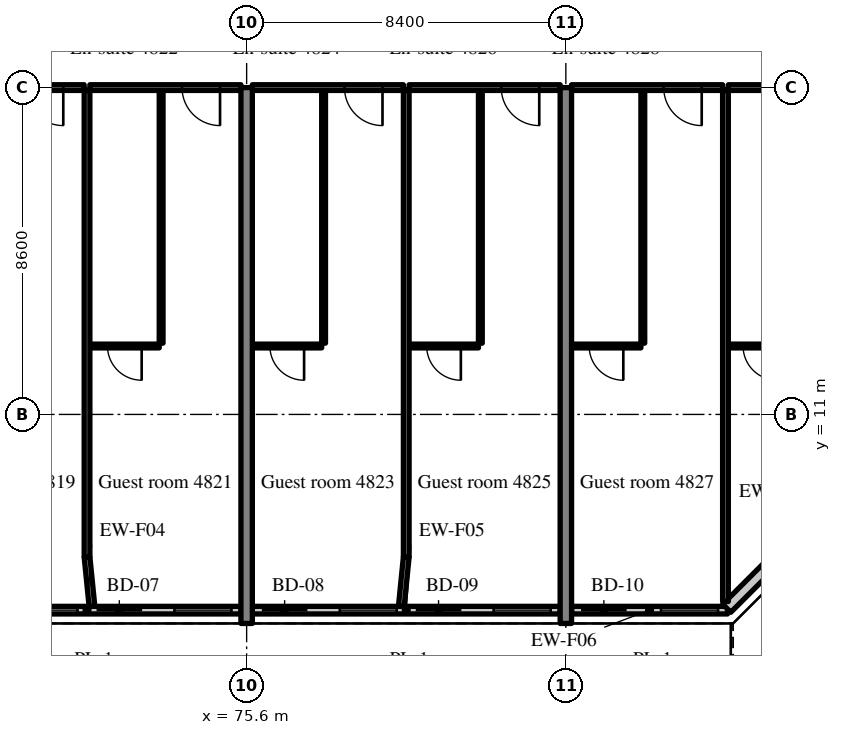
"""IFC4 building model, lengths in metres.
Left out: names, types, materials, properties, quantities, classifications, styles, units other than length and angle.
Written with IfcOpenShell. Run it as: python <this file> out.ifc"""

import sys

from ifc_helpers import new_model, si_unit, direction, frame, frame_2d, origin, place, context, subcontext, project, spatial, rectangle, extrude, source, transform, mapped, element, fill, save


model = new_model("IFC4")
c1 = context("Model", 3, precision=1e-05, world=origin(), true_north=direction((0.0, 1.0)))
c2 = subcontext(c1, "Body", "Model", "MODEL_VIEW")
j1 = project(units=[si_unit("LENGTHUNIT", "METRE"), si_unit("PLANEANGLEUNIT", "RADIAN")], contexts=[c1])
p1 = place(None, origin())
s1 = spatial("IfcSite", under=j1, at=p1, CompositionType="ELEMENT")
p2 = place(p1, origin())
s2 = spatial("IfcBuilding", under=s1, at=p2, CompositionType="ELEMENT")
p3 = place(p2, frame((0.0, 0.0, 197.2)))
s3 = spatial("IfcBuildingStorey", under=s2, at=p3, CompositionType="ELEMENT", Elevation=197.2)
m1 = source(origin(), c2, "Body", "SweptSolid", [
    extrude(rectangle(XDim=14.1, YDim=0.3, at=frame_2d((7.05, 0.0))), origin(), (0.0, 0.0, 1.0), 3.52),
])
for number, where, z_axis, x_axis in (
    (1, (75.6, 5.5, 0.0), (0.0, 0.0, 1.0), (0.0, 1.0, 0.0)),
    (2, (84.0, 5.5, 0.0), (0.0, 0.0, 1.0), (0.0, 1.0, 0.0)),
):
    element("IfcWall", number, at=place(p3, frame(where, z_axis=z_axis, x_axis=x_axis)), inside=s3, PredefinedType="SHEAR", context=c2, shape_type="MappedRepresentation", body=[
        mapped(m1, transform((0.0, 0.0, 0.0), scale=1.0)),
    ])
m2 = source(origin(), c2, "Body", "SweptSolid", [
    extrude(rectangle(XDim=8.1, YDim=0.2, at=frame_2d((4.05, 0.0))), origin(), (0.0, 0.0, 1.0), 2.87),
])
p4 = place(p3, frame((67.35, 5.85, 0.0), z_axis=(0.0, 0.0, 1.0), x_axis=(1.0, 0.0, 0.0)))
e3 = element("IfcWall", 3, at=p4, inside=s3, PredefinedType="SOLIDWALL", context=c2, shape_type="MappedRepresentation", body=[
    mapped(m2, transform((0.0, 0.0, 0.0), scale=1.0)),
])
m3 = source(origin(), c2, "Body", "SweptSolid", [
    extrude(rectangle(XDim=1.2, YDim=2.4, at=frame_2d((0.6, 1.2))), frame((0.0, 0.11, 0.0), z_axis=(0.0, -1.0, 0.0), x_axis=(1.0, 0.0, 0.0)), (0.0, 0.0, 1.0), 0.22),
])
p5 = place(p4, frame((0.25, 0.0, 0.0)))
e4 = element("IfcOpeningElement", 4, at=p5, cuts=e3, PredefinedType="OPENING", context=c2, shape_type="MappedRepresentation", body=[
    mapped(m3, transform((0.0, 0.0, 0.0), scale=1.0)),
])
m4 = source(origin(), c2, "Body", "SweptSolid", [
    extrude(rectangle(XDim=1.5, YDim=1.5, at=frame_2d((0.75, 0.75))), frame((0.0, 0.11, 0.0), z_axis=(0.0, -1.0, 0.0), x_axis=(1.0, 0.0, 0.0)), (0.0, 0.0, 1.0), 0.22),
])
p6 = place(p4, frame((2.3, 0.0, 0.9)))
e5 = element("IfcOpeningElement", 5, at=p6, cuts=e3, PredefinedType="OPENING", context=c2, shape_type="MappedRepresentation", body=[
    mapped(m4, transform((0.0, 0.0, 0.0), scale=1.0)),
])
p7 = place(p4, frame((4.3, 0.0, 0.0)))
e6 = element("IfcOpeningElement", 6, at=p7, cuts=e3, PredefinedType="OPENING", context=c2, shape_type="MappedRepresentation", body=[
    mapped(m3, transform((0.0, 0.0, 0.0), scale=1.0)),
])
p8 = place(p4, frame((6.35, 0.0, 0.9)))
e7 = element("IfcOpeningElement", 7, at=p8, cuts=e3, PredefinedType="OPENING", context=c2, shape_type="MappedRepresentation", body=[
    mapped(m4, transform((0.0, 0.0, 0.0), scale=1.0)),
])
m5 = source(origin(), c2, "Body", "SweptSolid", [
    extrude(rectangle(XDim=8.1, YDim=0.2, at=frame_2d((4.05, 0.0))), origin(), (0.0, 0.0, 1.0), 2.87),
])
p9 = place(p3, frame((75.75, 5.85, 0.0), z_axis=(0.0, 0.0, 1.0), x_axis=(1.0, 0.0, 0.0)))
e8 = element("IfcWall", 8, at=p9, inside=s3, PredefinedType="SOLIDWALL", context=c2, shape_type="MappedRepresentation", body=[
    mapped(m5, transform((0.0, 0.0, 0.0), scale=1.0)),
])
p10 = place(p9, frame((0.25, 0.0, 0.0)))
e9 = element("IfcOpeningElement", 9, at=p10, cuts=e8, PredefinedType="OPENING", context=c2, shape_type="MappedRepresentation", body=[
    mapped(m3, transform((0.0, 0.0, 0.0), scale=1.0)),
])
p11 = place(p9, frame((2.3, 0.0, 0.9)))
e10 = element("IfcOpeningElement", 10, at=p11, cuts=e8, PredefinedType="OPENING", context=c2, shape_type="MappedRepresentation", body=[
    mapped(m4, transform((0.0, 0.0, 0.0), scale=1.0)),
])
p12 = place(p9, frame((4.3, 0.0, 0.0)))
e11 = element("IfcOpeningElement", 11, at=p12, cuts=e8, PredefinedType="OPENING", context=c2, shape_type="MappedRepresentation", body=[
    mapped(m3, transform((0.0, 0.0, 0.0), scale=1.0)),
])
p13 = place(p9, frame((6.35, 0.0, 0.9)))
e12 = element("IfcOpeningElement", 12, at=p13, cuts=e8, PredefinedType="OPENING", context=c2, shape_type="MappedRepresentation", body=[
    mapped(m4, transform((0.0, 0.0, 0.0), scale=1.0)),
])
m6 = source(origin(), c2, "Body", "SweptSolid", [
    extrude(rectangle(XDim=4.105, YDim=0.2, at=frame_2d((2.052, 0.0))), origin(), (0.0, 0.0, 1.0), 2.87),
])
p14 = place(p3, frame((84.15, 5.85, 0.0), z_axis=(0.0, 0.0, 1.0), x_axis=(1.0, 0.0, 0.0)))
e13 = element("IfcWall", 13, at=p14, inside=s3, PredefinedType="SOLIDWALL", context=c2, shape_type="MappedRepresentation", body=[
    mapped(m6, transform((0.0, 0.0, 0.0), scale=1.0)),
])
p15 = place(p14, frame((0.25, 0.0, 0.0)))
e14 = element("IfcOpeningElement", 14, at=p15, cuts=e13, PredefinedType="OPENING", context=c2, shape_type="MappedRepresentation", body=[
    mapped(m3, transform((0.0, 0.0, 0.0), scale=1.0)),
])
p16 = place(p14, frame((2.355, 0.0, 0.9)))
e15 = element("IfcOpeningElement", 15, at=p16, cuts=e13, PredefinedType="OPENING", context=c2, shape_type="MappedRepresentation", body=[
    mapped(m4, transform((0.0, 0.0, 0.0), scale=1.0)),
])
m7 = source(origin(), c2, "Body", "SweptSolid", [
    extrude(rectangle(XDim=5.326, YDim=0.3, at=frame_2d((2.663, 0.0))), origin(), (0.0, 0.0, 1.0), 3.52),
])
p17 = place(p3, frame((88.234, 5.9, 0.0), z_axis=(0.0, 0.0, 1.0), x_axis=(0.707083859269, 0.707129702361, 0.0)))
e16 = element("IfcWall", 16, at=p17, inside=s3, PredefinedType="SOLIDWALL", context=c2, shape_type="MappedRepresentation", body=[
    mapped(m7, transform((0.0, 0.0, 0.0), scale=1.0)),
])
m8 = source(origin(), c2, "Body", "SweptSolid", [
    extrude(rectangle(XDim=1.8, YDim=1.5, at=frame_2d((0.9, 0.75))), frame((0.0, 0.16, 0.0), z_axis=(0.0, -1.0, 0.0), x_axis=(1.0, 0.0, 0.0)), (0.0, 0.0, 1.0), 0.32),
])
p18 = place(p17, frame((1.689, 0.0, 0.9)))
e17 = element("IfcOpeningElement", 17, at=p18, cuts=e16, PredefinedType="OPENING", context=c2, shape_type="MappedRepresentation", body=[
    mapped(m8, transform((0.0, 0.0, 0.0), scale=1.0)),
])
m9 = source(origin(), c2, "Body", "SweptSolid", [
    extrude(rectangle(XDim=3.975, YDim=0.15, at=frame_2d((1.987, 0.0))), origin(), (0.0, 0.0, 1.0), 2.82),
])
p19 = place(p3, frame((67.35, 19.6, 0.0), z_axis=(0.0, 0.0, 1.0), x_axis=(1.0, 0.0, 0.0)))
e18 = element("IfcWall", 18, at=p19, inside=s3, PredefinedType="PARTITIONING", context=c2, shape_type="MappedRepresentation", body=[
    mapped(m9, transform((0.0, 0.0, 0.0), scale=1.0)),
])
m10 = source(origin(), c2, "Body", "SweptSolid", [
    extrude(rectangle(XDim=1.0, YDim=2.1, at=frame_2d((0.5, 1.05))), frame((0.0, 0.085, 0.0), z_axis=(0.0, -1.0, 0.0), x_axis=(1.0, 0.0, 0.0)), (0.0, 0.0, 1.0), 0.17),
])
p20 = place(p19, frame((2.425, 0.0, 0.0)))
e19 = element("IfcOpeningElement", 19, at=p20, cuts=e18, PredefinedType="OPENING", context=c2, shape_type="MappedRepresentation", body=[
    mapped(m10, transform((0.0, 0.0, 0.0), scale=1.0)),
])
m11 = source(origin(), c2, "Body", "SweptSolid", [
    extrude(rectangle(XDim=6.65, YDim=0.1, at=frame_2d((3.325, 0.0))), origin(), (0.0, 0.0, 1.0), 3.52),
])
p21 = place(p3, frame((73.35, 12.875, 0.0), z_axis=(0.0, 0.0, 1.0), x_axis=(0.0, 1.0, 0.0)))
e20 = element("IfcWall", 20, at=p21, inside=s3, PredefinedType="PARTITIONING", context=c2, shape_type="MappedRepresentation", body=[
    mapped(m11, transform((0.0, 0.0, 0.0), scale=1.0)),
])
m12 = source(origin(), c2, "Body", "SweptSolid", [
    extrude(rectangle(XDim=1.825, YDim=0.1, at=frame_2d((0.913, 0.0))), origin(), (0.0, 0.0, 1.0), 3.52),
])
p22 = place(p3, frame((71.475, 12.8, 0.0), z_axis=(0.0, 0.0, 1.0), x_axis=(1.0, 0.0, 0.0)))
e21 = element("IfcWall", 21, at=p22, inside=s3, PredefinedType="PARTITIONING", context=c2, shape_type="MappedRepresentation", body=[
    mapped(m12, transform((0.0, 0.0, 0.0), scale=1.0)),
])
m13 = source(origin(), c2, "Body", "SweptSolid", [
    extrude(rectangle(XDim=0.9, YDim=2.1, at=frame_2d((0.45, 1.05))), frame((0.0, 0.06, 0.0), z_axis=(0.0, -1.0, 0.0), x_axis=(1.0, 0.0, 0.0)), (0.0, 0.0, 1.0), 0.12),
])
p23 = place(p22, frame((0.463, 0.0, 0.0)))
e22 = element("IfcOpeningElement", 22, at=p23, cuts=e21, PredefinedType="OPENING", context=c2, shape_type="MappedRepresentation", body=[
    mapped(m13, transform((0.0, 0.0, 0.0), scale=1.0)),
])
p24 = place(p3, frame((71.475, 19.6, 0.0), z_axis=(0.0, 0.0, 1.0), x_axis=(1.0, 0.0, 0.0)))
e23 = element("IfcWall", 23, at=p24, inside=s3, PredefinedType="PARTITIONING", context=c2, shape_type="MappedRepresentation", body=[
    mapped(m9, transform((0.0, 0.0, 0.0), scale=1.0)),
])
p25 = place(p24, frame((2.425, 0.0, 0.0)))
e24 = element("IfcOpeningElement", 24, at=p25, cuts=e23, PredefinedType="OPENING", context=c2, shape_type="MappedRepresentation", body=[
    mapped(m10, transform((0.0, 0.0, 0.0), scale=1.0)),
])
m14 = source(origin(), c2, "Body", "SweptSolid", [
    extrude(rectangle(XDim=12.275, YDim=0.15, at=frame_2d((6.137, 0.0))), origin(), (0.0, 0.0, 1.0), 3.52),
])
p26 = place(p3, frame((71.4, 7.25, 0.0), z_axis=(0.0, 0.0, 1.0), x_axis=(0.0, 1.0, 0.0)))
e25 = element("IfcWall", 25, at=p26, inside=s3, PredefinedType="PARTITIONING", context=c2, shape_type="MappedRepresentation", body=[
    mapped(m14, transform((0.0, 0.0, 0.0), scale=1.0)),
])
p27 = place(p3, frame((77.625, 12.875, 0.0), z_axis=(0.0, 0.0, 1.0), x_axis=(0.0, 1.0, 0.0)))
e26 = element("IfcWall", 26, at=p27, inside=s3, PredefinedType="PARTITIONING", context=c2, shape_type="MappedRepresentation", body=[
    mapped(m11, transform((0.0, 0.0, 0.0), scale=1.0)),
])
p28 = place(p3, frame((75.75, 12.8, 0.0), z_axis=(0.0, 0.0, 1.0), x_axis=(1.0, 0.0, 0.0)))
e27 = element("IfcWall", 27, at=p28, inside=s3, PredefinedType="PARTITIONING", context=c2, shape_type="MappedRepresentation", body=[
    mapped(m12, transform((0.0, 0.0, 0.0), scale=1.0)),
])
p29 = place(p28, frame((0.462, 0.0, 0.0)))
e28 = element("IfcOpeningElement", 28, at=p29, cuts=e27, PredefinedType="OPENING", context=c2, shape_type="MappedRepresentation", body=[
    mapped(m13, transform((0.0, 0.0, 0.0), scale=1.0)),
])
m15 = source(origin(), c2, "Body", "SweptSolid", [
    extrude(rectangle(XDim=3.975, YDim=0.15, at=frame_2d((1.988, 0.0))), origin(), (0.0, 0.0, 1.0), 2.82),
])
p30 = place(p3, frame((75.75, 19.6, 0.0), z_axis=(0.0, 0.0, 1.0), x_axis=(1.0, 0.0, 0.0)))
e29 = element("IfcWall", 29, at=p30, inside=s3, PredefinedType="PARTITIONING", context=c2, shape_type="MappedRepresentation", body=[
    mapped(m15, transform((0.0, 0.0, 0.0), scale=1.0)),
])
p31 = place(p30, frame((2.425, 0.0, 0.0)))
e30 = element("IfcOpeningElement", 30, at=p31, cuts=e29, PredefinedType="OPENING", context=c2, shape_type="MappedRepresentation", body=[
    mapped(m10, transform((0.0, 0.0, 0.0), scale=1.0)),
])
p32 = place(p3, frame((81.75, 12.875, 0.0), z_axis=(0.0, 0.0, 1.0), x_axis=(0.0, 1.0, 0.0)))
e31 = element("IfcWall", 31, at=p32, inside=s3, PredefinedType="PARTITIONING", context=c2, shape_type="MappedRepresentation", body=[
    mapped(m11, transform((0.0, 0.0, 0.0), scale=1.0)),
])
p33 = place(p3, frame((79.875, 12.8, 0.0), z_axis=(0.0, 0.0, 1.0), x_axis=(1.0, 0.0, 0.0)))
e32 = element("IfcWall", 32, at=p33, inside=s3, PredefinedType="PARTITIONING", context=c2, shape_type="MappedRepresentation", body=[
    mapped(m12, transform((0.0, 0.0, 0.0), scale=1.0)),
])
p34 = place(p33, frame((0.462, 0.0, 0.0)))
e33 = element("IfcOpeningElement", 33, at=p34, cuts=e32, PredefinedType="OPENING", context=c2, shape_type="MappedRepresentation", body=[
    mapped(m13, transform((0.0, 0.0, 0.0), scale=1.0)),
])
p35 = place(p3, frame((79.875, 19.6, 0.0), z_axis=(0.0, 0.0, 1.0), x_axis=(1.0, 0.0, 0.0)))
e34 = element("IfcWall", 34, at=p35, inside=s3, PredefinedType="PARTITIONING", context=c2, shape_type="MappedRepresentation", body=[
    mapped(m15, transform((0.0, 0.0, 0.0), scale=1.0)),
])
p36 = place(p35, frame((2.425, 0.0, 0.0)))
e35 = element("IfcOpeningElement", 35, at=p36, cuts=e34, PredefinedType="OPENING", context=c2, shape_type="MappedRepresentation", body=[
    mapped(m10, transform((0.0, 0.0, 0.0), scale=1.0)),
])
p37 = place(p3, frame((79.8, 7.25, 0.0), z_axis=(0.0, 0.0, 1.0), x_axis=(0.0, 1.0, 0.0)))
e36 = element("IfcWall", 36, at=p37, inside=s3, PredefinedType="PARTITIONING", context=c2, shape_type="MappedRepresentation", body=[
    mapped(m14, transform((0.0, 0.0, 0.0), scale=1.0)),
])
p38 = place(p3, frame((86.025, 12.875, 0.0), z_axis=(0.0, 0.0, 1.0), x_axis=(0.0, 1.0, 0.0)))
e37 = element("IfcWall", 37, at=p38, inside=s3, PredefinedType="PARTITIONING", context=c2, shape_type="MappedRepresentation", body=[
    mapped(m11, transform((0.0, 0.0, 0.0), scale=1.0)),
])
m16 = source(origin(), c2, "Body", "SweptSolid", [
    extrude(rectangle(XDim=1.825, YDim=0.1, at=frame_2d((0.913, 0.0))), origin(), (0.0, 0.0, 1.0), 3.52),
])
p39 = place(p3, frame((84.15, 12.8, 0.0), z_axis=(0.0, 0.0, 1.0), x_axis=(1.0, 0.0, 0.0)))
e38 = element("IfcWall", 38, at=p39, inside=s3, PredefinedType="PARTITIONING", context=c2, shape_type="MappedRepresentation", body=[
    mapped(m16, transform((0.0, 0.0, 0.0), scale=1.0)),
])
p40 = place(p39, frame((0.462, 0.0, 0.0)))
e39 = element("IfcOpeningElement", 39, at=p40, cuts=e38, PredefinedType="OPENING", context=c2, shape_type="MappedRepresentation", body=[
    mapped(m13, transform((0.0, 0.0, 0.0), scale=1.0)),
])
p41 = place(p3, frame((84.15, 19.6, 0.0), z_axis=(0.0, 0.0, 1.0), x_axis=(1.0, 0.0, 0.0)))
e40 = element("IfcWall", 40, at=p41, inside=s3, PredefinedType="PARTITIONING", context=c2, shape_type="MappedRepresentation", body=[
    mapped(m15, transform((0.0, 0.0, 0.0), scale=1.0)),
])
p42 = place(p41, frame((2.425, 0.0, 0.0)))
e41 = element("IfcOpeningElement", 41, at=p42, cuts=e40, PredefinedType="OPENING", context=c2, shape_type="MappedRepresentation", body=[
    mapped(m10, transform((0.0, 0.0, 0.0), scale=1.0)),
])
m17 = source(origin(), c2, "Body", "SweptSolid", [
    extrude(rectangle(XDim=1.675, YDim=0.1, at=frame_2d((0.837, 0.0))), origin(), (0.0, 0.0, 1.0), 3.52),
])
p43 = place(p3, frame((88.275, 12.8, 0.0), z_axis=(0.0, 0.0, 1.0), x_axis=(1.0, 0.0, 0.0)))
e42 = element("IfcWall", 42, at=p43, inside=s3, PredefinedType="PARTITIONING", context=c2, shape_type="MappedRepresentation", body=[
    mapped(m17, transform((0.0, 0.0, 0.0), scale=1.0)),
])
p44 = place(p43, frame((0.388, 0.0, 0.0)))
e43 = element("IfcOpeningElement", 43, at=p44, cuts=e42, PredefinedType="OPENING", context=c2, shape_type="MappedRepresentation", body=[
    mapped(m13, transform((0.0, 0.0, 0.0), scale=1.0)),
])
m18 = source(origin(), c2, "Body", "SweptSolid", [
    extrude(rectangle(XDim=3.825, YDim=0.15, at=frame_2d((1.913, 0.0))), origin(), (0.0, 0.0, 1.0), 2.82),
])
p45 = place(p3, frame((88.275, 19.6, 0.0), z_axis=(0.0, 0.0, 1.0), x_axis=(1.0, 0.0, 0.0)))
e44 = element("IfcWall", 44, at=p45, inside=s3, PredefinedType="PARTITIONING", context=c2, shape_type="MappedRepresentation", body=[
    mapped(m18, transform((0.0, 0.0, 0.0), scale=1.0)),
])
p46 = place(p45, frame((2.275, 0.0, 0.0)))
e45 = element("IfcOpeningElement", 45, at=p46, cuts=e44, PredefinedType="OPENING", context=c2, shape_type="MappedRepresentation", body=[
    mapped(m10, transform((0.0, 0.0, 0.0), scale=1.0)),
])
m19 = source(origin(), c2, "Body", "SweptSolid", [
    extrude(rectangle(XDim=13.447, YDim=0.15, at=frame_2d((6.724, 0.0))), origin(), (0.0, 0.0, 1.0), 3.52),
])
p47 = place(p3, frame((88.2, 6.078, 0.0), z_axis=(0.0, 0.0, 1.0), x_axis=(0.0, 1.0, 0.0)))
e46 = element("IfcWall", 46, at=p47, inside=s3, PredefinedType="PARTITIONING", context=c2, shape_type="MappedRepresentation", body=[
    mapped(m19, transform((0.0, 0.0, 0.0), scale=1.0)),
])
m20 = source(origin(), c2, "Body", "SweptSolid", [
    extrude(rectangle(XDim=1.307, YDim=0.15, at=frame_2d((0.653, 0.0))), origin(), (0.0, 0.0, 1.0), 3.52),
])
for number, where, z_axis, x_axis in (
    (47, (71.53, 5.95, 0.0), (0.0, 0.0, 1.0), (-0.1, 0.995, 0.0)),
    (48, (79.67, 5.95, 0.0), (0.0, 0.0, 1.0), (0.1, 0.995, 0.0)),
):
    element("IfcWall", number, at=place(p3, frame(where, z_axis=z_axis, x_axis=x_axis)), inside=s3, PredefinedType="PARTITIONING", context=c2, shape_type="MappedRepresentation", body=[
        mapped(m20, transform((0.0, 0.0, 0.0), scale=1.0)),
    ])
m21 = source(origin(), c2, "Body", "SweptSolid", [
    extrude(rectangle(XDim=1.5, YDim=1.5, at=frame_2d((0.75, 0.75))), frame((0.0, 0.03, 0.0), z_axis=(0.0, -1.0, 0.0), x_axis=(1.0, 0.0, 0.0)), (0.0, 0.0, 1.0), 0.06),
])
p48 = place(p6, origin())
e49 = element("IfcWindow", 49, at=p48, inside=s3, PartitioningType="SINGLE_PANEL", PredefinedType="WINDOW", context=c2, shape_type="MappedRepresentation", body=[
    mapped(m21, transform((0.0, 0.0, 0.0), scale=1.0)),
])
fill(e5, e49)
m22 = source(origin(), c2, "Body", "SweptSolid", [
    extrude(rectangle(XDim=1.2, YDim=2.4, at=frame_2d((0.6, 1.2))), frame((0.0, 0.025, 0.0), z_axis=(0.0, -1.0, 0.0), x_axis=(1.0, 0.0, 0.0)), (0.0, 0.0, 1.0), 0.05),
])
p49 = place(p7, origin())
e50 = element("IfcDoor", 50, at=p49, inside=s3, OperationType="SLIDING_TO_LEFT", PredefinedType="DOOR", context=c2, shape_type="MappedRepresentation", body=[
    mapped(m22, transform((0.0, 0.0, 0.0), scale=1.0)),
])
fill(e6, e50)
p50 = place(p8, origin())
e51 = element("IfcWindow", 51, at=p50, inside=s3, PartitioningType="SINGLE_PANEL", PredefinedType="WINDOW", context=c2, shape_type="MappedRepresentation", body=[
    mapped(m21, transform((0.0, 0.0, 0.0), scale=1.0)),
])
fill(e7, e51)
p51 = place(p10, origin())
e52 = element("IfcDoor", 52, at=p51, inside=s3, OperationType="SLIDING_TO_RIGHT", PredefinedType="DOOR", context=c2, shape_type="MappedRepresentation", body=[
    mapped(m22, transform((0.0, 0.0, 0.0), scale=1.0)),
])
fill(e9, e52)
p52 = place(p11, origin())
e53 = element("IfcWindow", 53, at=p52, inside=s3, PartitioningType="SINGLE_PANEL", PredefinedType="WINDOW", context=c2, shape_type="MappedRepresentation", body=[
    mapped(m21, transform((0.0, 0.0, 0.0), scale=1.0)),
])
fill(e10, e53)
p53 = place(p12, origin())
e54 = element("IfcDoor", 54, at=p53, inside=s3, OperationType="SLIDING_TO_LEFT", PredefinedType="DOOR", context=c2, shape_type="MappedRepresentation", body=[
    mapped(m22, transform((0.0, 0.0, 0.0), scale=1.0)),
])
fill(e11, e54)
p54 = place(p13, origin())
e55 = element("IfcWindow", 55, at=p54, inside=s3, PartitioningType="SINGLE_PANEL", PredefinedType="WINDOW", context=c2, shape_type="MappedRepresentation", body=[
    mapped(m21, transform((0.0, 0.0, 0.0), scale=1.0)),
])
fill(e12, e55)
p55 = place(p15, origin())
e56 = element("IfcDoor", 56, at=p55, inside=s3, OperationType="SLIDING_TO_RIGHT", PredefinedType="DOOR", context=c2, shape_type="MappedRepresentation", body=[
    mapped(m22, transform((0.0, 0.0, 0.0), scale=1.0)),
])
fill(e14, e56)
p56 = place(p16, origin())
e57 = element("IfcWindow", 57, at=p56, inside=s3, PartitioningType="SINGLE_PANEL", PredefinedType="WINDOW", context=c2, shape_type="MappedRepresentation", body=[
    mapped(m21, transform((0.0, 0.0, 0.0), scale=1.0)),
])
fill(e15, e57)
m23 = source(origin(), c2, "Body", "SweptSolid", [
    extrude(rectangle(XDim=1.0, YDim=2.1, at=frame_2d((0.5, 1.05))), frame((0.0, 0.025, 0.0), z_axis=(0.0, -1.0, 0.0), x_axis=(1.0, 0.0, 0.0)), (0.0, 0.0, 1.0), 0.05),
])
p57 = place(p20, origin())
e58 = element("IfcDoor", 58, at=p57, inside=s3, OperationType="SINGLE_SWING_RIGHT", PredefinedType="DOOR", context=c2, shape_type="MappedRepresentation", body=[
    mapped(m23, transform((0.0, 0.0, 0.0), scale=1.0)),
])
fill(e19, e58)
m24 = source(origin(), c2, "Body", "SweptSolid", [
    extrude(rectangle(XDim=0.9, YDim=2.1, at=frame_2d((0.45, 1.05))), frame((0.0, 0.025, 0.0), z_axis=(0.0, -1.0, 0.0), x_axis=(1.0, 0.0, 0.0)), (0.0, 0.0, 1.0), 0.05),
])
p58 = place(p23, origin())
e59 = element("IfcDoor", 59, at=p58, inside=s3, OperationType="SINGLE_SWING_RIGHT", PredefinedType="DOOR", context=c2, shape_type="MappedRepresentation", body=[
    mapped(m24, transform((0.0, 0.0, 0.0), scale=1.0)),
])
fill(e22, e59)
p59 = place(p25, origin())
e60 = element("IfcDoor", 60, at=p59, inside=s3, OperationType="SINGLE_SWING_RIGHT", PredefinedType="DOOR", context=c2, shape_type="MappedRepresentation", body=[
    mapped(m23, transform((0.0, 0.0, 0.0), scale=1.0)),
])
fill(e24, e60)
p60 = place(p29, origin())
e61 = element("IfcDoor", 61, at=p60, inside=s3, OperationType="SINGLE_SWING_RIGHT", PredefinedType="DOOR", context=c2, shape_type="MappedRepresentation", body=[
    mapped(m24, transform((0.0, 0.0, 0.0), scale=1.0)),
])
fill(e28, e61)
p61 = place(p31, origin())
e62 = element("IfcDoor", 62, at=p61, inside=s3, OperationType="SINGLE_SWING_RIGHT", PredefinedType="DOOR", context=c2, shape_type="MappedRepresentation", body=[
    mapped(m23, transform((0.0, 0.0, 0.0), scale=1.0)),
])
fill(e30, e62)
p62 = place(p34, origin())
e63 = element("IfcDoor", 63, at=p62, inside=s3, OperationType="SINGLE_SWING_RIGHT", PredefinedType="DOOR", context=c2, shape_type="MappedRepresentation", body=[
    mapped(m24, transform((0.0, 0.0, 0.0), scale=1.0)),
])
fill(e33, e63)
p63 = place(p36, origin())
e64 = element("IfcDoor", 64, at=p63, inside=s3, OperationType="SINGLE_SWING_RIGHT", PredefinedType="DOOR", context=c2, shape_type="MappedRepresentation", body=[
    mapped(m23, transform((0.0, 0.0, 0.0), scale=1.0)),
])
fill(e35, e64)
p64 = place(p40, origin())
e65 = element("IfcDoor", 65, at=p64, inside=s3, OperationType="SINGLE_SWING_RIGHT", PredefinedType="DOOR", context=c2, shape_type="MappedRepresentation", body=[
    mapped(m24, transform((0.0, 0.0, 0.0), scale=1.0)),
])
fill(e39, e65)
p65 = place(p42, origin())
e66 = element("IfcDoor", 66, at=p65, inside=s3, OperationType="SINGLE_SWING_RIGHT", PredefinedType="DOOR", context=c2, shape_type="MappedRepresentation", body=[
    mapped(m23, transform((0.0, 0.0, 0.0), scale=1.0)),
])
fill(e41, e66)
p66 = place(p44, origin())
e67 = element("IfcDoor", 67, at=p66, inside=s3, OperationType="SINGLE_SWING_RIGHT", PredefinedType="DOOR", context=c2, shape_type="MappedRepresentation", body=[
    mapped(m24, transform((0.0, 0.0, 0.0), scale=1.0)),
])
fill(e43, e67)
save(model, sys.argv[1])
